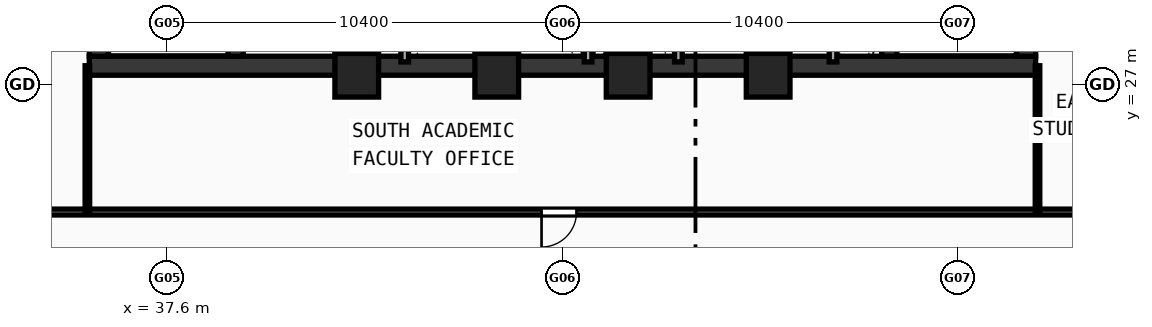
"""IFC4 building model, lengths in metres.
Left out: names, types, materials, properties, quantities, classifications, styles, units other than length and angle.
Written with IfcOpenShell. Run it as: python <this file> out.ifc"""

import sys

from ifc_helpers import new_model, si_unit, direction, frame, frame_2d, origin, origin_2d, place, context, subcontext, project, spatial, rectangle, hollow_rectangle, extrude, source, transform, mapped, element, fill, save


model = new_model("IFC4")
c1 = context("Model", 3, precision=1e-05, world=origin(), true_north=direction((0.0, 1.0)))
c2 = subcontext(c1, "Body", "Model", "MODEL_VIEW")
j1 = project(units=[si_unit("LENGTHUNIT", "METRE"), si_unit("PLANEANGLEUNIT", "RADIAN")], contexts=[c1])
p1 = place(None, origin())
s1 = spatial("IfcSite", under=j1, at=p1, CompositionType="ELEMENT")
p2 = place(p1, origin())
s2 = spatial("IfcBuilding", under=s1, at=p2, CompositionType="ELEMENT")
p3 = place(p2, frame((0.0, 0.0, 188.56)))
s3 = spatial("IfcBuildingStorey", under=s2, at=p3, CompositionType="ELEMENT", Elevation=188.56)
p4 = place(p3, frame((35.55, 27.5, 0.0), z_axis=(0.0, 0.0, 1.0), x_axis=(1.0, 0.0, 0.0)))
e1 = element("IfcWall", 1, at=p4, inside=s3, PredefinedType="SHEAR", context=c2, shape_type="SweptSolid", body=[
    extrude(rectangle(XDim=24.9, YDim=0.5, at=frame_2d((12.45, 0.0))), origin(), (0.0, 0.0, 1.0), 3.54),
])
for number, where, z_axis, x_axis in (
    (2, (35.8, 27.75, 0.0), (0.0, 0.0, 1.0), (0.0, 1.0, 0.0)),
    (3, (60.2, 27.75, 0.0), (0.0, 0.0, 1.0), (0.0, 1.0, 0.0)),
):
    element("IfcWall", number, at=place(p3, frame(where, z_axis=z_axis, x_axis=x_axis)), inside=s3, PredefinedType="SHEAR", context=c2, shape_type="SweptSolid", body=[
        extrude(rectangle(XDim=12.2, YDim=0.5, at=frame_2d((6.1, 0.0))), origin(), (0.0, 0.0, 1.0), 3.54),
    ])
p5 = place(p3, frame((39.4, 27.75, 0.0), z_axis=(0.0, 0.0, 1.0), x_axis=(0.0, 1.0, 0.0)))
e4 = element("IfcWall", 4, at=p5, inside=s3, PredefinedType="SHEAR", context=c2, shape_type="SweptSolid", body=[
    extrude(rectangle(XDim=12.2, YDim=0.4, at=frame_2d((6.1, 0.0))), origin(), (0.0, 0.0, 1.0), 3.54),
])
p6 = place(p5, frame((10.0, 0.0, 0.0)))
e5 = element("IfcOpeningElement", 5, at=p6, cuts=e4, PredefinedType="OPENING", context=c2, shape_type="SweptSolid", body=[
    extrude(rectangle(XDim=1.1, YDim=2.1, at=frame_2d((0.55, 1.05))), frame((0.0, 0.21, 0.0), z_axis=(0.0, -1.0, 0.0), x_axis=(1.0, 0.0, 0.0)), (0.0, 0.0, 1.0), 0.42),
])
p7 = place(p3, frame((56.6, 27.75, 0.0), z_axis=(0.0, 0.0, 1.0), x_axis=(0.0, 1.0, 0.0)))
e6 = element("IfcWall", 6, at=p7, inside=s3, PredefinedType="SHEAR", context=c2, shape_type="SweptSolid", body=[
    extrude(rectangle(XDim=12.2, YDim=0.4, at=frame_2d((6.1, 0.0))), origin(), (0.0, 0.0, 1.0), 3.54),
])
p8 = place(p7, frame((10.0, 0.0, 0.0)))
e7 = element("IfcOpeningElement", 7, at=p8, cuts=e6, PredefinedType="OPENING", context=c2, shape_type="SweptSolid", body=[
    extrude(rectangle(XDim=1.1, YDim=2.1, at=frame_2d((0.55, 1.05))), frame((0.0, 0.21, 0.0), z_axis=(0.0, -1.0, 0.0), x_axis=(1.0, 0.0, 0.0)), (0.0, 0.0, 1.0), 0.42),
])
m1 = source(origin(), c2, "Body", "SweptSolid", [
    extrude(hollow_rectangle(XDim=1.15, YDim=1.15, WallThickness=0.048, at=origin_2d()), origin(), (0.0, 0.0, 1.0), 3.8),
])
for number, where, z_axis, x_axis in (
    (8, (42.588, 27.25, -0.26), (0.0, 0.0, 1.0), (1.0, 0.0, 0.0)),
    (9, (46.272, 27.25, -0.26), (0.0, 0.0, 1.0), (1.0, 0.0, 0.0)),
    (10, (49.729, 27.25, -0.26), (0.0, 0.0, 1.0), (1.0, 0.0, 0.0)),
    (11, (53.412, 27.25, -0.26), (0.0, 0.0, 1.0), (1.0, 0.0, 0.0)),
):
    element("IfcColumn", number, at=place(p3, frame(where, z_axis=z_axis, x_axis=x_axis)), inside=s3, PredefinedType="COLUMN", context=c2, shape_type="MappedRepresentation", body=[
        mapped(m1, transform((0.0, 0.0, 0.0), scale=1.0)),
    ])
p9 = place(p3, frame((43.85, 27.6, 0.0), z_axis=(0.0, 0.0, 1.0), x_axis=(0.0, 1.0, 0.0)))
e12 = element("IfcWall", 12, at=p9, inside=s3, PredefinedType="SOLIDWALL", context=c2, shape_type="SweptSolid", body=[
    extrude(rectangle(XDim=6.22, YDim=0.2, at=frame_2d((3.11, 0.0))), origin(), (0.0, 0.0, 1.0), 3.54),
])
p10 = place(p9, frame((2.25, 0.0, 0.0)))
e13 = element("IfcOpeningElement", 13, at=p10, cuts=e12, PredefinedType="OPENING", context=c2, shape_type="SweptSolid", body=[
    extrude(rectangle(XDim=1.05, YDim=2.1, at=frame_2d((0.525, 1.05))), frame((0.0, 0.11, 0.0), z_axis=(0.0, -1.0, 0.0), x_axis=(1.0, 0.0, 0.0)), (0.0, 0.0, 1.0), 0.22),
])
p11 = place(p3, frame((53.68, 27.6, 0.0), z_axis=(0.0, 0.0, 1.0), x_axis=(0.0, 1.0, 0.0)))
e14 = element("IfcWall", 14, at=p11, inside=s3, PredefinedType="SOLIDWALL", context=c2, shape_type="SweptSolid", body=[
    extrude(rectangle(XDim=9.05, YDim=0.2, at=frame_2d((4.525, 0.0))), origin(), (0.0, 0.0, 1.0), 3.54),
])
p12 = place(p11, frame((6.9, 0.0, 0.0)))
e15 = element("IfcOpeningElement", 15, at=p12, cuts=e14, PredefinedType="OPENING", context=c2, shape_type="SweptSolid", body=[
    extrude(rectangle(XDim=1.05, YDim=2.1, at=frame_2d((0.525, 1.05))), frame((0.0, 0.11, 0.0), z_axis=(0.0, -1.0, 0.0), x_axis=(1.0, 0.0, 0.0)), (0.0, 0.0, 1.0), 0.22),
])
for number, where, z_axis, x_axis in (
    (16, (51.05, 27.6, 0.0), (0.0, 0.0, 1.0), (0.0, 1.0, 0.0)),
    (17, (46.225, 27.6, 0.0), (0.0, 0.0, 1.0), (0.0, 1.0, 0.0)),
    (18, (48.675, 27.6, 0.0), (0.0, 0.0, 1.0), (0.0, 1.0, 0.0)),
    (19, (55.12, 27.6, 0.0), (0.0, 0.0, 1.0), (0.0, 1.0, 0.0)),
):
    element("IfcWall", number, at=place(p3, frame(where, z_axis=z_axis, x_axis=x_axis)), inside=s3, PredefinedType="SOLIDWALL", context=c2, shape_type="SweptSolid", body=[
        extrude(rectangle(XDim=2.12, YDim=0.2, at=frame_2d((1.06, 0.0))), origin(), (0.0, 0.0, 1.0), 3.54),
    ])
p13 = place(p3, frame((42.32, 27.6, 0.0), z_axis=(0.0, 0.0, 1.0), x_axis=(0.0, 1.0, 0.0)))
e20 = element("IfcWall", 20, at=p13, inside=s3, PredefinedType="PARTITIONING", context=c2, shape_type="SweptSolid", body=[
    extrude(rectangle(XDim=5.9, YDim=0.155, at=frame_2d((2.95, 0.0))), origin(), (0.0, 0.0, 1.0), 3.54),
])
p14 = place(p13, frame((1.1, 0.0, 0.0)))
e21 = element("IfcOpeningElement", 21, at=p14, cuts=e20, PredefinedType="OPENING", context=c2, shape_type="SweptSolid", body=[
    extrude(rectangle(XDim=0.9, YDim=2.1, at=frame_2d((0.45, 1.05))), frame((0.0, 0.087, 0.0), z_axis=(0.0, -1.0, 0.0), x_axis=(1.0, 0.0, 0.0)), (0.0, 0.0, 1.0), 0.175),
])
p15 = place(p13, frame((3.6, 0.0, 0.0)))
e22 = element("IfcOpeningElement", 22, at=p15, cuts=e20, PredefinedType="OPENING", context=c2, shape_type="SweptSolid", body=[
    extrude(rectangle(XDim=0.94, YDim=2.1, at=frame_2d((0.47, 1.05))), frame((0.0, 0.087, 0.0), z_axis=(0.0, -1.0, 0.0), x_axis=(1.0, 0.0, 0.0)), (0.0, 0.0, 1.0), 0.175),
])
p16 = place(p3, frame((31.45, 23.65, 0.0), z_axis=(0.0, 0.0, 1.0), x_axis=(1.0, 0.0, 0.0)))
e23 = element("IfcWall", 23, at=p16, inside=s3, PredefinedType="PARTITIONING", context=c2, shape_type="SweptSolid", body=[
    extrude(rectangle(XDim=33.1, YDim=0.155, at=frame_2d((16.55, 0.0))), origin(), (0.0, 0.0, 1.0), 2.89),
])
p17 = place(p16, frame((16.0, 0.0, 0.0)))
e24 = element("IfcOpeningElement", 24, at=p17, cuts=e23, PredefinedType="OPENING", context=c2, shape_type="SweptSolid", body=[
    extrude(rectangle(XDim=0.92, YDim=2.1, at=frame_2d((0.46, 1.05))), frame((0.0, 0.087, 0.0), z_axis=(0.0, -1.0, 0.0), x_axis=(1.0, 0.0, 0.0)), (0.0, 0.0, 1.0), 0.175),
])
for number, where, z_axis, x_axis in (
    (25, (35.5, 23.65, 0.0), (0.0, 0.0, 1.0), (0.0, 1.0, 0.0)),
    (26, (60.5, 23.65, 0.0), (0.0, 0.0, 1.0), (0.0, 1.0, 0.0)),
):
    element("IfcWall", number, at=place(p3, frame(where, z_axis=z_axis, x_axis=x_axis)), inside=s3, PredefinedType="PARTITIONING", context=c2, shape_type="SweptSolid", body=[
        extrude(rectangle(XDim=3.85, YDim=0.12, at=frame_2d((1.925, 0.0))), origin(), (0.0, 0.0, 1.0), 3.14),
    ])
m2 = source(origin(), c2, "Body", "SweptSolid", [
    extrude(rectangle(XDim=0.92, YDim=2.1, at=frame_2d((0.46, 1.05))), frame((0.0, 0.025, 0.0), z_axis=(0.0, -1.0, 0.0), x_axis=(1.0, 0.0, 0.0)), (0.0, 0.0, 1.0), 0.05),
])
p18 = place(p17, frame((0.92, 0.0, 0.0), z_axis=(0.0, 0.0, 1.0), x_axis=(-1.0, 0.0, 0.0)))
e27 = element("IfcDoor", 27, at=p18, inside=s3, OperationType="SINGLE_SWING_RIGHT", PredefinedType="DOOR", context=c2, shape_type="MappedRepresentation", body=[
    mapped(m2, transform((0.0, 0.0, 0.0), scale=1.0)),
])
fill(e24, e27)
save(model, sys.argv[1])
